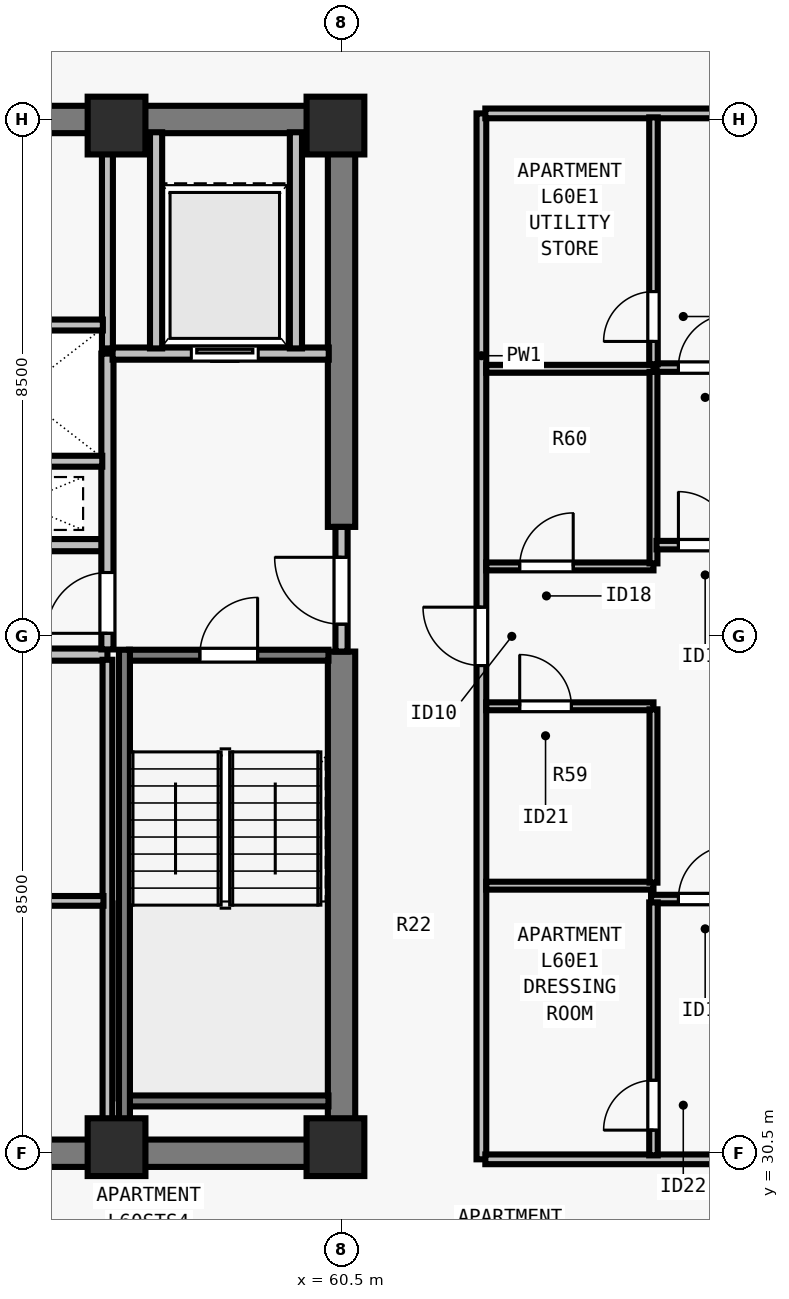
"""IFC4 building model, lengths in metres.
Left out: names, types, materials, properties, quantities, classifications, styles, units other than length and angle.
Written with IfcOpenShell. Run it as: python <this file> out.ifc"""

import sys

from ifc_helpers import new_model, si_unit, direction, frame, frame_2d, origin, origin_2d, place, context, subcontext, project, spatial, rectangle, extrude, element, fill, save


model = new_model("IFC4")
c1 = context("Model", 3, precision=1e-05, world=origin(), true_north=direction((0.0, 1.0)))
c2 = subcontext(c1, "Body", "Model", "MODEL_VIEW")
j1 = project(units=[si_unit("LENGTHUNIT", "METRE"), si_unit("PLANEANGLEUNIT", "RADIAN")], contexts=[c1])
p1 = place(None, origin())
s1 = spatial("IfcSite", under=j1, at=p1, CompositionType="ELEMENT")
p2 = place(p1, origin())
s2 = spatial("IfcBuilding", under=s1, at=p2, CompositionType="ELEMENT")
p3 = place(p2, frame((0.0, 0.0, 220.0)))
s3 = spatial("IfcBuildingStorey", under=s2, at=p3, CompositionType="ELEMENT", Elevation=220.0)
for number, where, z_axis, x_axis in (
    (1, (56.8, 30.6, 0.0), (0.0, 0.0, 1.0), (1.0, 0.0, 0.0)),
    (2, (60.4, 30.6, 0.0), (0.0, 0.0, 1.0), (1.0, 0.0, 0.0)),
    (3, (56.8, 47.4, 0.0), (0.0, 0.0, 1.0), (1.0, 0.0, 0.0)),
    (4, (60.4, 47.4, 0.0), (0.0, 0.0, 1.0), (1.0, 0.0, 0.0)),
):
    element("IfcColumn", number, at=place(p3, frame(where, z_axis=z_axis, x_axis=x_axis)), inside=s3, PredefinedType="COLUMN", context=c2, shape_type="SweptSolid", body=[
        extrude(rectangle(XDim=0.95, YDim=0.95, at=origin_2d()), origin(), (0.0, 0.0, 1.0), 3.5),
    ])
for number, where, z_axis, x_axis in (
    (5, (43.275, 30.5, 0.0), (0.0, 0.0, 1.0), (1.0, 0.0, 0.0)),
    (6, (43.275, 47.5, 0.0), (0.0, 0.0, 1.0), (1.0, 0.0, 0.0)),
):
    element("IfcWall", number, at=place(p3, frame(where, z_axis=z_axis, x_axis=x_axis)), inside=s3, PredefinedType="SHEAR", context=c2, shape_type="SweptSolid", body=[
        extrude(rectangle(XDim=17.45, YDim=0.45, at=frame_2d((8.725, 0.0))), origin(), (0.0, 0.0, 1.0), 3.29),
    ])
p4 = place(p3, frame((60.5, 30.715, 0.0), z_axis=(0.0, 0.0, 1.0), x_axis=(0.0, 1.0, 0.0)))
e7 = element("IfcWall", 7, at=p4, inside=s3, PredefinedType="SHEAR", context=c2, shape_type="SweptSolid", body=[
    extrude(rectangle(XDim=8.035, YDim=0.45, at=frame_2d((4.018, 0.0))), origin(), (0.0, 0.0, 1.0), 3.29),
])
p5 = place(p3, frame((60.5, 40.8, 0.0), z_axis=(0.0, 0.0, 1.0), x_axis=(0.0, 1.0, 0.0)))
e8 = element("IfcWall", 8, at=p5, inside=s3, PredefinedType="SHEAR", context=c2, shape_type="SweptSolid", body=[
    extrude(rectangle(XDim=6.485, YDim=0.45, at=frame_2d((3.242, 0.0))), origin(), (0.0, 0.0, 1.0), 3.29),
])
for number, where, z_axis, x_axis in (
    (9, (53.7, 38.7, 0.0), (0.0, 0.0, 1.0), (1.0, 0.0, 0.0)),
    (10, (53.7, 40.5, 0.0), (0.0, 0.0, 1.0), (1.0, 0.0, 0.0)),
):
    element("IfcWall", number, at=place(p3, frame(where, z_axis=z_axis, x_axis=x_axis)), inside=s3, PredefinedType="SOLIDWALL", context=c2, shape_type="SweptSolid", body=[
        extrude(rectangle(XDim=2.95, YDim=0.2, at=frame_2d((1.475, 0.0))), origin(), (0.0, 0.0, 1.0), 3.29),
    ])
p6 = place(p3, frame((60.5, 38.75, 0.0), z_axis=(0.0, 0.0, 1.0), x_axis=(0.0, 1.0, 0.0)))
e11 = element("IfcWall", 11, at=p6, inside=s3, PredefinedType="SOLIDWALL", context=c2, shape_type="SweptSolid", body=[
    extrude(rectangle(XDim=2.05, YDim=0.2, at=frame_2d((1.025, 0.0))), origin(), (0.0, 0.0, 1.0), 3.29),
])
p7 = place(p6, frame((0.45, 0.0, 0.0)))
e12 = element("IfcOpeningElement", 12, at=p7, cuts=e11, PredefinedType="OPENING", context=c2, shape_type="SweptSolid", body=[
    extrude(rectangle(XDim=1.1, YDim=2.15, at=frame_2d((0.55, 1.075))), frame((0.0, 0.11, 0.0), z_axis=(0.0, -1.0, 0.0), x_axis=(1.0, 0.0, 0.0)), (0.0, 0.0, 1.0), 0.22),
])
p8 = place(p3, frame((56.65, 38.785, 0.0), z_axis=(0.0, 0.0, 1.0), x_axis=(0.0, 1.0, 0.0)))
e13 = element("IfcWall", 13, at=p8, inside=s3, PredefinedType="SOLIDWALL", context=c2, shape_type="SweptSolid", body=[
    extrude(rectangle(XDim=4.865, YDim=0.2, at=frame_2d((2.433, 0.0))), origin(), (0.0, 0.0, 1.0), 3.29),
])
p9 = place(p8, frame((0.265, 0.0, 0.0)))
e14 = element("IfcOpeningElement", 14, at=p9, cuts=e13, PredefinedType="OPENING", context=c2, shape_type="SweptSolid", body=[
    extrude(rectangle(XDim=1.0, YDim=2.15, at=frame_2d((0.5, 1.075))), frame((0.0, 0.11, 0.0), z_axis=(0.0, -1.0, 0.0), x_axis=(1.0, 0.0, 0.0)), (0.0, 0.0, 1.0), 0.22),
])
p10 = place(p3, frame((56.735, 43.65, 0.0), z_axis=(0.0, 0.0, 1.0), x_axis=(1.0, 0.0, 0.0)))
e15 = element("IfcWall", 15, at=p10, inside=s3, PredefinedType="SOLIDWALL", context=c2, shape_type="SweptSolid", body=[
    extrude(rectangle(XDim=3.555, YDim=0.2, at=frame_2d((1.777, 0.0))), origin(), (0.0, 0.0, 1.0), 3.29),
])
p11 = place(p10, frame((1.295, 0.0, 0.0)))
e16 = element("IfcOpeningElement", 16, at=p11, cuts=e15, PredefinedType="OPENING", context=c2, shape_type="SweptSolid", body=[
    extrude(rectangle(XDim=1.1, YDim=2.2, at=frame_2d((0.55, 1.1))), frame((0.0, 0.11, 0.0), z_axis=(0.0, -1.0, 0.0), x_axis=(1.0, 0.0, 0.0)), (0.0, 0.0, 1.0), 0.22),
])
for number, where, z_axis, x_axis in (
    (17, (57.45, 43.735, 0.0), (0.0, 0.0, 1.0), (0.0, 1.0, 0.0)),
    (18, (59.75, 43.735, 0.0), (0.0, 0.0, 1.0), (0.0, 1.0, 0.0)),
):
    element("IfcWall", number, at=place(p3, frame(where, z_axis=z_axis, x_axis=x_axis)), inside=s3, PredefinedType="SOLIDWALL", context=c2, shape_type="SweptSolid", body=[
        extrude(rectangle(XDim=3.555, YDim=0.2, at=frame_2d((1.777, 0.0))), origin(), (0.0, 0.0, 1.0), 3.29),
    ])
p12 = place(p3, frame((56.65, 30.71, 0.0), z_axis=(0.0, 0.0, 1.0), x_axis=(0.0, 1.0, 0.0)))
e19 = element("IfcWall", 19, at=p12, inside=s3, PredefinedType="PARTITIONING", context=c2, shape_type="SweptSolid", body=[
    extrude(rectangle(XDim=7.905, YDim=0.16, at=frame_2d((3.953, 0.0))), origin(), (0.0, 0.0, 1.0), 3.29),
])
p13 = place(p3, frame((53.785, 34.65, 0.0), z_axis=(0.0, 0.0, 1.0), x_axis=(1.0, 0.0, 0.0)))
e20 = element("IfcWall", 20, at=p13, inside=s3, PredefinedType="PARTITIONING", context=c2, shape_type="SweptSolid", body=[
    extrude(rectangle(XDim=2.8, YDim=0.16, at=frame_2d((1.4, 0.0))), origin(), (0.0, 0.0, 1.0), 3.29),
])
p14 = place(p3, frame((56.65, 43.735, 0.0), z_axis=(0.0, 0.0, 1.0), x_axis=(0.0, 1.0, 0.0)))
e21 = element("IfcWall", 21, at=p14, inside=s3, PredefinedType="SOLIDWALL", context=c2, shape_type="SweptSolid", body=[
    extrude(rectangle(XDim=3.555, YDim=0.18, at=frame_2d((1.777, 0.0))), origin(), (0.0, 0.0, 1.0), 3.29),
])
p15 = place(p3, frame((53.785, 41.88, 0.0), z_axis=(0.0, 0.0, 1.0), x_axis=(1.0, 0.0, 0.0)))
e22 = element("IfcWall", 22, at=p15, inside=s3, PredefinedType="SOLIDWALL", context=c2, shape_type="SweptSolid", body=[
    extrude(rectangle(XDim=2.78, YDim=0.18, at=frame_2d((1.39, 0.0))), origin(), (0.0, 0.0, 1.0), 3.29),
])
p16 = place(p3, frame((53.785, 44.12, 0.0), z_axis=(0.0, 0.0, 1.0), x_axis=(1.0, 0.0, 0.0)))
e23 = element("IfcWall", 23, at=p16, inside=s3, PredefinedType="SOLIDWALL", context=c2, shape_type="SweptSolid", body=[
    extrude(rectangle(XDim=2.79, YDim=0.18, at=frame_2d((1.395, 0.0))), origin(), (0.0, 0.0, 1.0), 3.29),
])
p17 = place(p3, frame((62.8, 30.4, 0.0), z_axis=(0.0, 0.0, 1.0), x_axis=(0.0, 1.0, 0.0)))
e24 = element("IfcWall", 24, at=p17, inside=s3, PredefinedType="PARTITIONING", context=c2, shape_type="SweptSolid", body=[
    extrude(rectangle(XDim=17.2, YDim=0.16, at=frame_2d((8.6, 0.0))), origin(), (0.0, 0.0, 1.0), 3.29),
])
p18 = place(p17, frame((8.12, 0.0, 0.0)))
e25 = element("IfcOpeningElement", 25, at=p18, cuts=e24, PredefinedType="OPENING", context=c2, shape_type="SweptSolid", body=[
    extrude(rectangle(XDim=0.96, YDim=2.18, at=frame_2d((0.48, 1.09))), frame((0.0, 0.09, 0.0), z_axis=(0.0, -1.0, 0.0), x_axis=(1.0, 0.0, 0.0)), (0.0, 0.0, 1.0), 0.18),
])
for number, where, z_axis, x_axis in (
    (26, (62.865, 30.4, 0.0), (0.0, 0.0, 1.0), (1.0, 0.0, 0.0)),
    (27, (62.865, 47.6, 0.0), (0.0, 0.0, 1.0), (1.0, 0.0, 0.0)),
):
    element("IfcWall", number, at=place(p3, frame(where, z_axis=z_axis, x_axis=x_axis)), inside=s3, PredefinedType="PARTITIONING", context=c2, shape_type="SweptSolid", body=[
        extrude(rectangle(XDim=11.33, YDim=0.16, at=frame_2d((5.665, 0.0))), origin(), (0.0, 0.0, 1.0), 3.29),
    ])
p19 = place(p3, frame((62.88, 34.9, 0.0), z_axis=(0.0, 0.0, 1.0), x_axis=(1.0, 0.0, 0.0)))
e28 = element("IfcWall", 28, at=p19, inside=s3, PredefinedType="PLUMBINGWALL", context=c2, shape_type="SweptSolid", body=[
    extrude(rectangle(XDim=2.75, YDim=0.13, at=frame_2d((1.375, 0.0))), origin(), (0.0, 0.0, 1.0), 3.29),
])
p20 = place(p3, frame((62.88, 37.85, 0.0), z_axis=(0.0, 0.0, 1.0), x_axis=(1.0, 0.0, 0.0)))
e29 = element("IfcWall", 29, at=p20, inside=s3, PredefinedType="PLUMBINGWALL", context=c2, shape_type="SweptSolid", body=[
    extrude(rectangle(XDim=2.75, YDim=0.13, at=frame_2d((1.375, 0.0))), origin(), (0.0, 0.0, 1.0), 3.29),
])
p21 = place(p20, frame((0.55, 0.0, 0.0)))
e30 = element("IfcOpeningElement", 30, at=p21, cuts=e29, PredefinedType="OPENING", context=c2, shape_type="SweptSolid", body=[
    extrude(rectangle(XDim=0.85, YDim=2.08, at=frame_2d((0.425, 1.04))), frame((0.0, 0.075, 0.0), z_axis=(0.0, -1.0, 0.0), x_axis=(1.0, 0.0, 0.0)), (0.0, 0.0, 1.0), 0.15),
])
p22 = place(p3, frame((65.63, 34.95, 0.0), z_axis=(0.0, 0.0, 1.0), x_axis=(0.0, 1.0, 0.0)))
e31 = element("IfcWall", 31, at=p22, inside=s3, PredefinedType="PLUMBINGWALL", context=c2, shape_type="SweptSolid", body=[
    extrude(rectangle(XDim=2.85, YDim=0.13, at=frame_2d((1.425, 0.0))), origin(), (0.0, 0.0, 1.0), 3.29),
])
p23 = place(p3, frame((62.88, 43.4, 0.0), z_axis=(0.0, 0.0, 1.0), x_axis=(1.0, 0.0, 0.0)))
e32 = element("IfcWall", 32, at=p23, inside=s3, PredefinedType="PLUMBINGWALL", context=c2, shape_type="SweptSolid", body=[
    extrude(rectangle(XDim=2.75, YDim=0.13, at=frame_2d((1.375, 0.0))), origin(), (0.0, 0.0, 1.0), 3.29),
])
p24 = place(p3, frame((62.88, 40.15, 0.0), z_axis=(0.0, 0.0, 1.0), x_axis=(1.0, 0.0, 0.0)))
e33 = element("IfcWall", 33, at=p24, inside=s3, PredefinedType="PLUMBINGWALL", context=c2, shape_type="SweptSolid", body=[
    extrude(rectangle(XDim=2.75, YDim=0.13, at=frame_2d((1.375, 0.0))), origin(), (0.0, 0.0, 1.0), 3.29),
])
p25 = place(p24, frame((0.55, 0.0, 0.0)))
e34 = element("IfcOpeningElement", 34, at=p25, cuts=e33, PredefinedType="OPENING", context=c2, shape_type="SweptSolid", body=[
    extrude(rectangle(XDim=0.88, YDim=2.1, at=frame_2d((0.44, 1.05))), frame((0.0, 0.075, 0.0), z_axis=(0.0, -1.0, 0.0), x_axis=(1.0, 0.0, 0.0)), (0.0, 0.0, 1.0), 0.15),
])
p26 = place(p3, frame((65.63, 40.2, 0.0), z_axis=(0.0, 0.0, 1.0), x_axis=(0.0, 1.0, 0.0)))
e35 = element("IfcWall", 35, at=p26, inside=s3, PredefinedType="PLUMBINGWALL", context=c2, shape_type="SweptSolid", body=[
    extrude(rectangle(XDim=3.15, YDim=0.13, at=frame_2d((1.575, 0.0))), origin(), (0.0, 0.0, 1.0), 3.29),
])
p27 = place(p3, frame((65.59, 34.68, 0.0), z_axis=(0.0, 0.0, 1.0), x_axis=(1.0, 0.0, 0.0)))
e36 = element("IfcWall", 36, at=p27, inside=s3, PredefinedType="PARTITIONING", context=c2, shape_type="SweptSolid", body=[
    extrude(rectangle(XDim=8.53, YDim=0.14, at=frame_2d((4.265, 0.0))), origin(), (0.0, 0.0, 1.0), 3.29),
])
p28 = place(p27, frame((0.45, 0.0, 0.0)))
e37 = element("IfcOpeningElement", 37, at=p28, cuts=e36, PredefinedType="OPENING", context=c2, shape_type="SweptSolid", body=[
    extrude(rectangle(XDim=0.88, YDim=2.1, at=frame_2d((0.44, 1.05))), frame((0.0, 0.08, 0.0), z_axis=(0.0, -1.0, 0.0), x_axis=(1.0, 0.0, 0.0)), (0.0, 0.0, 1.0), 0.16),
])
p29 = place(p3, frame((65.63, 30.465, 0.0), z_axis=(0.0, 0.0, 1.0), x_axis=(0.0, 1.0, 0.0)))
e38 = element("IfcWall", 38, at=p29, inside=s3, PredefinedType="PARTITIONING", context=c2, shape_type="SweptSolid", body=[
    extrude(rectangle(XDim=4.16, YDim=0.14, at=frame_2d((2.08, 0.0))), origin(), (0.0, 0.0, 1.0), 3.29),
])
p30 = place(p29, frame((0.415, 0.0, 0.0)))
e39 = element("IfcOpeningElement", 39, at=p30, cuts=e38, PredefinedType="OPENING", context=c2, shape_type="SweptSolid", body=[
    extrude(rectangle(XDim=0.82, YDim=2.1, at=frame_2d((0.41, 1.05))), frame((0.0, 0.08, 0.0), z_axis=(0.0, -1.0, 0.0), x_axis=(1.0, 0.0, 0.0)), (0.0, 0.0, 1.0), 0.16),
])
p31 = place(p3, frame((65.68, 43.42, 0.0), z_axis=(0.0, 0.0, 1.0), x_axis=(1.0, 0.0, 0.0)))
e40 = element("IfcWall", 40, at=p31, inside=s3, PredefinedType="PARTITIONING", context=c2, shape_type="SweptSolid", body=[
    extrude(rectangle(XDim=8.44, YDim=0.14, at=frame_2d((4.22, 0.0))), origin(), (0.0, 0.0, 1.0), 3.29),
])
p32 = place(p31, frame((0.36, 0.0, 0.0)))
e41 = element("IfcOpeningElement", 41, at=p32, cuts=e40, PredefinedType="OPENING", context=c2, shape_type="SweptSolid", body=[
    extrude(rectangle(XDim=0.88, YDim=2.1, at=frame_2d((0.44, 1.05))), frame((0.0, 0.08, 0.0), z_axis=(0.0, -1.0, 0.0), x_axis=(1.0, 0.0, 0.0)), (0.0, 0.0, 1.0), 0.16),
])
p33 = place(p3, frame((65.63, 43.475, 0.0), z_axis=(0.0, 0.0, 1.0), x_axis=(0.0, 1.0, 0.0)))
e42 = element("IfcWall", 42, at=p33, inside=s3, PredefinedType="PARTITIONING", context=c2, shape_type="SweptSolid", body=[
    extrude(rectangle(XDim=4.06, YDim=0.14, at=frame_2d((2.03, 0.0))), origin(), (0.0, 0.0, 1.0), 3.29),
])
p34 = place(p33, frame((0.375, 0.0, 0.0)))
e43 = element("IfcOpeningElement", 43, at=p34, cuts=e42, PredefinedType="OPENING", context=c2, shape_type="SweptSolid", body=[
    extrude(rectangle(XDim=0.82, YDim=2.1, at=frame_2d((0.41, 1.05))), frame((0.0, 0.08, 0.0), z_axis=(0.0, -1.0, 0.0), x_axis=(1.0, 0.0, 0.0)), (0.0, 0.0, 1.0), 0.16),
])
p35 = place(p3, frame((65.68, 40.5, 0.0), z_axis=(0.0, 0.0, 1.0), x_axis=(1.0, 0.0, 0.0)))
e44 = element("IfcWall", 44, at=p35, inside=s3, PredefinedType="PARTITIONING", context=c2, shape_type="SweptSolid", body=[
    extrude(rectangle(XDim=8.44, YDim=0.14, at=frame_2d((4.22, 0.0))), origin(), (0.0, 0.0, 1.0), 3.29),
])
p36 = place(p35, frame((0.36, 0.0, 0.0)))
e45 = element("IfcOpeningElement", 45, at=p36, cuts=e44, PredefinedType="OPENING", context=c2, shape_type="SweptSolid", body=[
    extrude(rectangle(XDim=0.88, YDim=2.1, at=frame_2d((0.44, 1.05))), frame((0.0, 0.08, 0.0), z_axis=(0.0, -1.0, 0.0), x_axis=(1.0, 0.0, 0.0)), (0.0, 0.0, 1.0), 0.16),
])
p37 = place(p3, frame((57.005, 38.69, 0.0), z_axis=(0.0, 0.0, 1.0), x_axis=(1.0, 0.0, 0.0)))
e46 = element("IfcWall", 46, at=p37, inside=s3, PredefinedType="SOLIDWALL", context=c2, shape_type="SweptSolid", body=[
    extrude(rectangle(XDim=3.28, YDim=0.18, at=frame_2d((1.64, 0.0))), origin(), (0.0, 0.0, 1.0), 3.29),
])
p38 = place(p37, frame((1.165, 0.0, 0.0)))
e47 = element("IfcOpeningElement", 47, at=p38, cuts=e46, PredefinedType="OPENING", context=c2, shape_type="SweptSolid", body=[
    extrude(rectangle(XDim=0.95, YDim=2.15, at=frame_2d((0.475, 1.075))), frame((0.0, 0.1, 0.0), z_axis=(0.0, -1.0, 0.0), x_axis=(1.0, 0.0, 0.0)), (0.0, 0.0, 1.0), 0.2),
])
p39 = place(p3, frame((57.005, 31.36, 0.0), z_axis=(0.0, 0.0, 1.0), x_axis=(1.0, 0.0, 0.0)))
e48 = element("IfcWall", 48, at=p39, inside=s3, PredefinedType="SOLIDWALL", context=c2, shape_type="SweptSolid", body=[
    extrude(rectangle(XDim=3.28, YDim=0.18, at=frame_2d((1.64, 0.0))), origin(), (0.0, 0.0, 1.0), 3.29),
])
p40 = place(p3, frame((56.93, 38.78, 0.0), z_axis=(0.0, 0.0, 1.0), x_axis=(0.0, -1.0, 0.0)))
e49 = element("IfcWall", 49, at=p40, inside=s3, PredefinedType="SOLIDWALL", context=c2, shape_type="SweptSolid", body=[
    extrude(rectangle(XDim=8.067, YDim=0.18, at=frame_2d((4.034, 0.0))), origin(), (0.0, 0.0, 1.0), 3.29),
])
p41 = place(p7, origin())
e50 = element("IfcDoor", 50, at=p41, inside=s3, OperationType="SINGLE_SWING_RIGHT", PredefinedType="DOOR", context=c2, shape_type="SweptSolid", body=[
    extrude(rectangle(XDim=1.1, YDim=2.15, at=frame_2d((0.55, 1.075))), frame((0.0, 0.025, 0.0), z_axis=(0.0, -1.0, 0.0), x_axis=(1.0, 0.0, 0.0)), (0.0, 0.0, 1.0), 0.05),
])
fill(e12, e50)
p42 = place(p9, origin())
e51 = element("IfcDoor", 51, at=p42, inside=s3, OperationType="SINGLE_SWING_LEFT", PredefinedType="DOOR", context=c2, shape_type="SweptSolid", body=[
    extrude(rectangle(XDim=1.0, YDim=2.15, at=frame_2d((0.5, 1.075))), frame((0.0, 0.025, 0.0), z_axis=(0.0, -1.0, 0.0), x_axis=(1.0, 0.0, 0.0)), (0.0, 0.0, 1.0), 0.05),
])
fill(e14, e51)
p43 = place(p11, origin())
e52 = element("IfcDoor", 52, at=p43, inside=s3, OperationType="SLIDING_TO_LEFT", PredefinedType="DOOR", context=c2, shape_type="SweptSolid", body=[
    extrude(rectangle(XDim=1.1, YDim=2.2, at=frame_2d((0.55, 1.1))), frame((0.0, 0.025, 0.0), z_axis=(0.0, -1.0, 0.0), x_axis=(1.0, 0.0, 0.0)), (0.0, 0.0, 1.0), 0.05),
])
fill(e16, e52)
p44 = place(p21, origin())
e53 = element("IfcDoor", 53, at=p44, inside=s3, OperationType="SINGLE_SWING_LEFT", PredefinedType="DOOR", context=c2, shape_type="SweptSolid", body=[
    extrude(rectangle(XDim=0.85, YDim=2.08, at=frame_2d((0.425, 1.04))), frame((0.0, 0.025, 0.0), z_axis=(0.0, -1.0, 0.0), x_axis=(1.0, 0.0, 0.0)), (0.0, 0.0, 1.0), 0.05),
])
fill(e30, e53)
p45 = place(p25, origin())
e54 = element("IfcDoor", 54, at=p45, inside=s3, OperationType="SINGLE_SWING_RIGHT", PredefinedType="DOOR", context=c2, shape_type="SweptSolid", body=[
    extrude(rectangle(XDim=0.88, YDim=2.1, at=frame_2d((0.44, 1.05))), frame((0.0, 0.025, 0.0), z_axis=(0.0, -1.0, 0.0), x_axis=(1.0, 0.0, 0.0)), (0.0, 0.0, 1.0), 0.05),
])
fill(e34, e54)
p46 = place(p30, origin())
e55 = element("IfcDoor", 55, at=p46, inside=s3, OperationType="SINGLE_SWING_LEFT", PredefinedType="DOOR", context=c2, shape_type="SweptSolid", body=[
    extrude(rectangle(XDim=0.82, YDim=2.1, at=frame_2d((0.41, 1.05))), frame((0.0, 0.025, 0.0), z_axis=(0.0, -1.0, 0.0), x_axis=(1.0, 0.0, 0.0)), (0.0, 0.0, 1.0), 0.05),
])
fill(e39, e55)
p47 = place(p28, origin())
e56 = element("IfcDoor", 56, at=p47, inside=s3, OperationType="SINGLE_SWING_RIGHT", PredefinedType="DOOR", context=c2, shape_type="SweptSolid", body=[
    extrude(rectangle(XDim=0.88, YDim=2.1, at=frame_2d((0.44, 1.05))), frame((0.0, 0.025, 0.0), z_axis=(0.0, -1.0, 0.0), x_axis=(1.0, 0.0, 0.0)), (0.0, 0.0, 1.0), 0.05),
])
fill(e37, e56)
p48 = place(p34, origin())
e57 = element("IfcDoor", 57, at=p48, inside=s3, OperationType="SINGLE_SWING_LEFT", PredefinedType="DOOR", context=c2, shape_type="SweptSolid", body=[
    extrude(rectangle(XDim=0.82, YDim=2.1, at=frame_2d((0.41, 1.05))), frame((0.0, 0.025, 0.0), z_axis=(0.0, -1.0, 0.0), x_axis=(1.0, 0.0, 0.0)), (0.0, 0.0, 1.0), 0.05),
])
fill(e43, e57)
p49 = place(p32, origin())
e58 = element("IfcDoor", 58, at=p49, inside=s3, OperationType="SINGLE_SWING_RIGHT", PredefinedType="DOOR", context=c2, shape_type="SweptSolid", body=[
    extrude(rectangle(XDim=0.88, YDim=2.1, at=frame_2d((0.44, 1.05))), frame((0.0, 0.025, 0.0), z_axis=(0.0, -1.0, 0.0), x_axis=(1.0, 0.0, 0.0)), (0.0, 0.0, 1.0), 0.05),
])
fill(e41, e58)
p50 = place(p36, origin())
e59 = element("IfcDoor", 59, at=p50, inside=s3, OperationType="SINGLE_SWING_LEFT", PredefinedType="DOOR", context=c2, shape_type="SweptSolid", body=[
    extrude(rectangle(XDim=0.88, YDim=2.1, at=frame_2d((0.44, 1.05))), frame((0.0, 0.025, 0.0), z_axis=(0.0, -1.0, 0.0), x_axis=(1.0, 0.0, 0.0)), (0.0, 0.0, 1.0), 0.05),
])
fill(e45, e59)
p51 = place(p18, origin())
e60 = element("IfcDoor", 60, at=p51, inside=s3, OperationType="SINGLE_SWING_RIGHT", PredefinedType="DOOR", context=c2, shape_type="SweptSolid", body=[
    extrude(rectangle(XDim=0.96, YDim=2.18, at=frame_2d((0.48, 1.09))), frame((0.0, 0.025, 0.0), z_axis=(0.0, -1.0, 0.0), x_axis=(1.0, 0.0, 0.0)), (0.0, 0.0, 1.0), 0.05),
])
fill(e25, e60)
p52 = place(p38, origin())
e61 = element("IfcDoor", 61, at=p52, inside=s3, OperationType="SINGLE_SWING_RIGHT", PredefinedType="DOOR", context=c2, shape_type="SweptSolid", body=[
    extrude(rectangle(XDim=0.95, YDim=2.15, at=frame_2d((0.475, 1.075))), frame((0.0, 0.025, 0.0), z_axis=(0.0, -1.0, 0.0), x_axis=(1.0, 0.0, 0.0)), (0.0, 0.0, 1.0), 0.05),
])
fill(e47, e61)
save(model, sys.argv[1])
